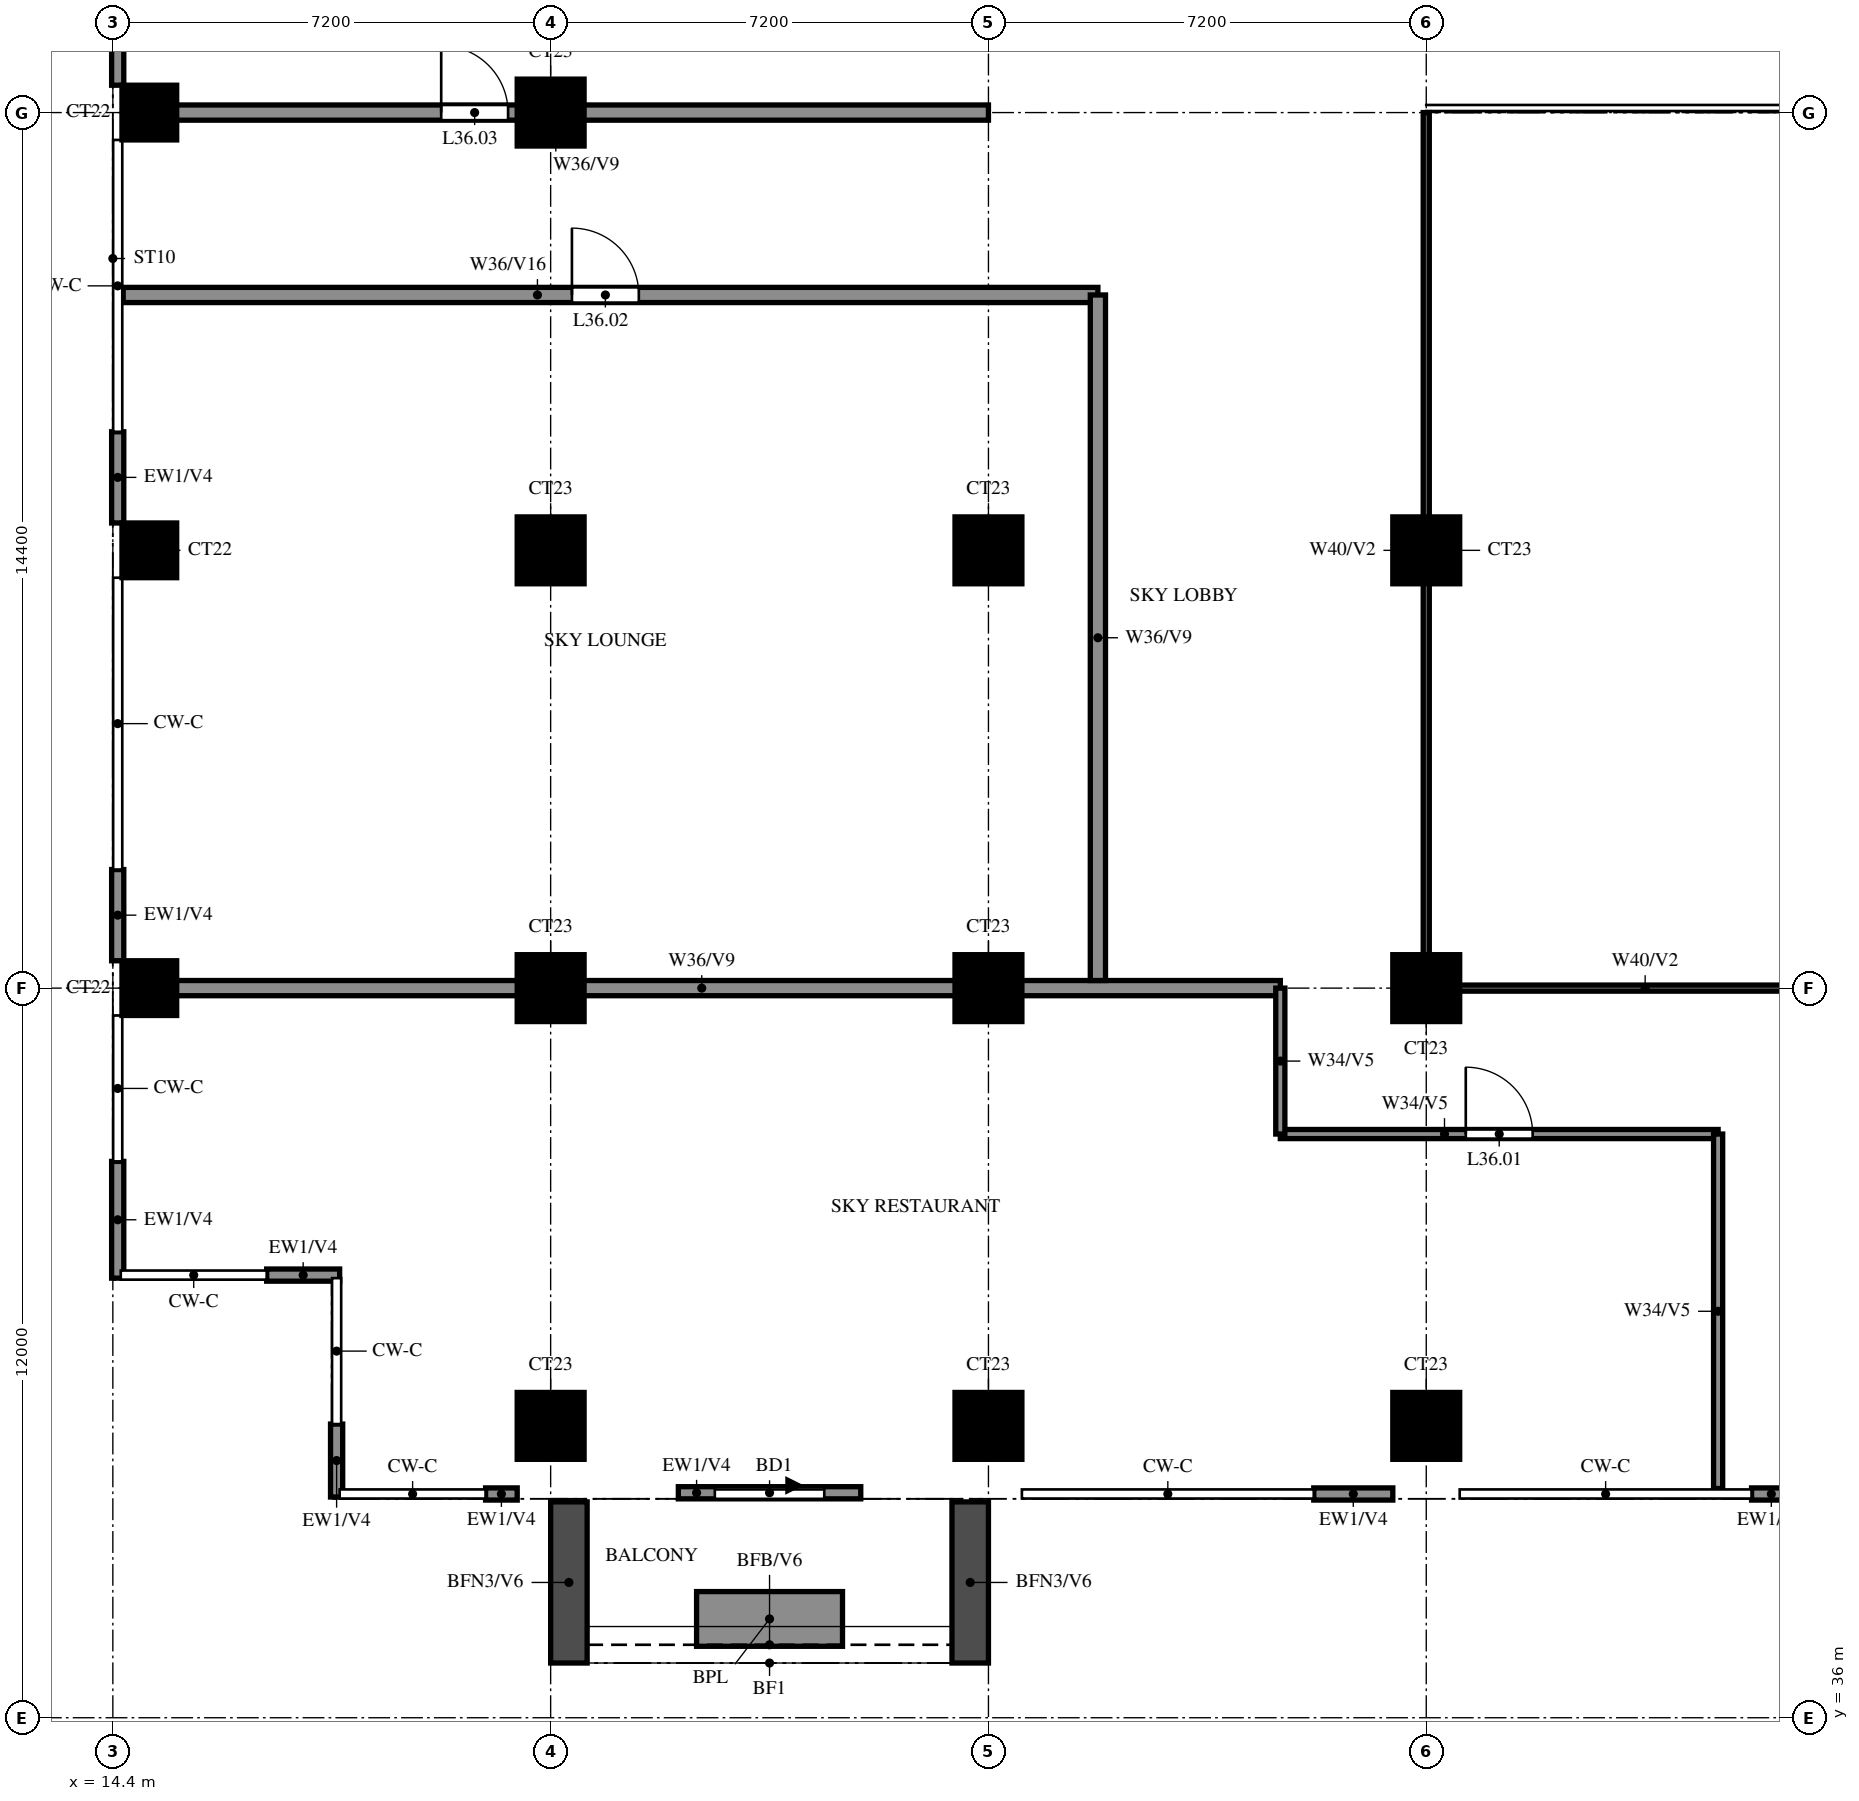
"""IFC4 building model, lengths in metres.
Left out: names, types, materials, properties, quantities, classifications, styles, units other than length and angle.
Written with IfcOpenShell. Run it as: python <this file> out.ifc"""

import sys

from ifc_helpers import new_model, si_unit, direction, frame, frame_2d, origin, origin_2d, place, context, subcontext, project, spatial, rectangle, extrude, source, transform, mapped, element, fill, save


model = new_model("IFC4")
c1 = context("Model", 3, precision=1e-05, world=origin(), true_north=direction((0.0, 1.0)))
c2 = subcontext(c1, "Body", "Model", "MODEL_VIEW")
j1 = project(units=[si_unit("LENGTHUNIT", "METRE"), si_unit("PLANEANGLEUNIT", "RADIAN")], contexts=[c1])
p1 = place(None, origin())
s1 = spatial("IfcSite", under=j1, at=p1, CompositionType="ELEMENT")
p2 = place(p1, origin())
s2 = spatial("IfcBuilding", under=s1, at=p2, CompositionType="ELEMENT")
p3 = place(p2, frame((0.0, 0.0, 137.5)))
s3 = spatial("IfcBuildingStorey", under=s2, at=p3, CompositionType="ELEMENT", Elevation=137.5)
m1 = source(origin(), c2, "Body", "SweptSolid", [
    extrude(rectangle(XDim=1.1, YDim=1.1, at=origin_2d()), origin(), (0.0, 0.0, 1.0), 5.2),
])
for number, where, z_axis, x_axis in (
    (1, (21.6, 40.8, 0.0), (0.0, 0.0, 1.0), (1.0, 0.0, 0.0)),
    (2, (28.8, 40.8, 0.0), (0.0, 0.0, 1.0), (1.0, 0.0, 0.0)),
    (3, (36.0, 40.8, 0.0), (0.0, 0.0, 1.0), (1.0, 0.0, 0.0)),
):
    element("IfcColumn", number, at=place(p3, frame(where, z_axis=z_axis, x_axis=x_axis)), inside=s3, PredefinedType="COLUMN", context=c2, shape_type="MappedRepresentation", body=[
        mapped(m1, transform((0.0, 0.0, 0.0))),
    ])
m2 = source(origin(), c2, "Body", "SweptSolid", [
    extrude(rectangle(XDim=0.9, YDim=0.9, at=origin_2d()), origin(), (0.0, 0.0, 1.0), 5.2),
])
p4 = place(p3, frame((15.0, 48.0, 0.0), z_axis=(0.0, 0.0, 1.0), x_axis=(1.0, 0.0, 0.0)))
e4 = element("IfcColumn", 4, at=p4, inside=s3, PredefinedType="COLUMN", context=c2, shape_type="MappedRepresentation", body=[
    mapped(m2, transform((0.0, 0.0, 0.0))),
])
for number, where, z_axis, x_axis in (
    (5, (21.6, 48.0, 0.0), (0.0, 0.0, 1.0), (1.0, 0.0, 0.0)),
    (6, (28.8, 48.0, 0.0), (0.0, 0.0, 1.0), (1.0, 0.0, 0.0)),
    (7, (36.0, 48.0, 0.0), (0.0, 0.0, 1.0), (1.0, 0.0, 0.0)),
):
    element("IfcColumn", number, at=place(p3, frame(where, z_axis=z_axis, x_axis=x_axis)), inside=s3, PredefinedType="COLUMN", context=c2, shape_type="MappedRepresentation", body=[
        mapped(m1, transform((0.0, 0.0, 0.0))),
    ])
p5 = place(p3, frame((15.0, 55.2, 0.0), z_axis=(0.0, 0.0, 1.0), x_axis=(1.0, 0.0, 0.0)))
e8 = element("IfcColumn", 8, at=p5, inside=s3, PredefinedType="COLUMN", context=c2, shape_type="MappedRepresentation", body=[
    mapped(m2, transform((0.0, 0.0, 0.0))),
])
for number, where, z_axis, x_axis in (
    (9, (21.6, 55.2, 0.0), (0.0, 0.0, 1.0), (1.0, 0.0, 0.0)),
    (10, (28.8, 55.2, 0.0), (0.0, 0.0, 1.0), (1.0, 0.0, 0.0)),
    (11, (36.0, 55.2, 0.0), (0.0, 0.0, 1.0), (1.0, 0.0, 0.0)),
):
    element("IfcColumn", number, at=place(p3, frame(where, z_axis=z_axis, x_axis=x_axis)), inside=s3, PredefinedType="COLUMN", context=c2, shape_type="MappedRepresentation", body=[
        mapped(m1, transform((0.0, 0.0, 0.0))),
    ])
p6 = place(p3, frame((15.0, 62.4, 0.0), z_axis=(0.0, 0.0, 1.0), x_axis=(1.0, 0.0, 0.0)))
e12 = element("IfcColumn", 12, at=p6, inside=s3, PredefinedType="COLUMN", context=c2, shape_type="MappedRepresentation", body=[
    mapped(m2, transform((0.0, 0.0, 0.0))),
])
p7 = place(p3, frame((21.6, 62.4, 0.0), z_axis=(0.0, 0.0, 1.0), x_axis=(1.0, 0.0, 0.0)))
e13 = element("IfcColumn", 13, at=p7, inside=s3, PredefinedType="COLUMN", context=c2, shape_type="MappedRepresentation", body=[
    mapped(m1, transform((0.0, 0.0, 0.0))),
])
for number, where, z_axis, x_axis in (
    (14, (14.48, 64.35, 0.0), (0.0, 0.0, 1.0), (0.0, -1.0, 0.0)),
    (15, (14.48, 57.15, 0.0), (0.0, 0.0, 1.0), (0.0, -1.0, 0.0)),
    (16, (14.48, 49.95, 0.0), (0.0, 0.0, 1.0), (0.0, -1.0, 0.0)),
):
    element("IfcWall", number, at=place(p3, frame(where, z_axis=z_axis, x_axis=x_axis)), inside=s3, PredefinedType="SOLIDWALL", context=c2, shape_type="SweptSolid", body=[
        extrude(rectangle(XDim=1.5, YDim=0.2, at=frame_2d((0.75, 0.0))), origin(), (0.0, 0.0, 1.0), 5.2),
    ])
p8 = place(p3, frame((14.48, 45.15, 0.0), z_axis=(0.0, 0.0, 1.0), x_axis=(0.0, -1.0, 0.0)))
e17 = element("IfcWall", 17, at=p8, inside=s3, PredefinedType="SOLIDWALL", context=c2, shape_type="SweptSolid", body=[
    extrude(rectangle(XDim=1.92, YDim=0.2, at=frame_2d((0.96, 0.0))), origin(), (0.0, 0.0, 1.0), 5.2),
])
p9 = place(p3, frame((16.93, 43.28, 0.0), z_axis=(0.0, 0.0, 1.0), x_axis=(1.0, 0.0, 0.0)))
e18 = element("IfcWall", 18, at=p9, inside=s3, PredefinedType="SOLIDWALL", context=c2, shape_type="SweptSolid", body=[
    extrude(rectangle(XDim=1.2, YDim=0.2, at=frame_2d((0.6, 0.0))), origin(), (0.0, 0.0, 1.0), 5.2),
])
p10 = place(p3, frame((18.08, 40.83, 0.0), z_axis=(0.0, 0.0, 1.0), x_axis=(0.0, -1.0, 0.0)))
e19 = element("IfcWall", 19, at=p10, inside=s3, PredefinedType="SOLIDWALL", context=c2, shape_type="SweptSolid", body=[
    extrude(rectangle(XDim=1.2, YDim=0.2, at=frame_2d((0.6, 0.0))), origin(), (0.0, 0.0, 1.0), 5.2),
])
p11 = place(p3, frame((23.7, 39.7, 0.0), z_axis=(0.0, 0.0, 1.0), x_axis=(1.0, 0.0, 0.0)))
e20 = element("IfcWall", 20, at=p11, inside=s3, PredefinedType="SOLIDWALL", context=c2, shape_type="SweptSolid", body=[
    extrude(rectangle(XDim=3.0, YDim=0.2, at=frame_2d((1.5, 0.0))), origin(), (0.0, 0.0, 1.0), 5.2),
])
p12 = place(p11, frame((0.6, 0.0, 0.0)))
e21 = element("IfcOpeningElement", 21, at=p12, cuts=e20, PredefinedType="OPENING", context=c2, shape_type="SweptSolid", body=[
    extrude(rectangle(XDim=1.8, YDim=2.4, at=frame_2d((0.9, 1.2))), frame((0.0, 0.11, 0.0), z_axis=(0.0, -1.0, 0.0), x_axis=(1.0, 0.0, 0.0)), (0.0, 0.0, 1.0), 0.22),
])
p13 = place(p3, frame((20.53, 39.68, 0.0), z_axis=(0.0, 0.0, 1.0), x_axis=(1.0, 0.0, 0.0)))
e22 = element("IfcWall", 22, at=p13, inside=s3, PredefinedType="SOLIDWALL", context=c2, shape_type="SweptSolid", body=[
    extrude(rectangle(XDim=0.52, YDim=0.2, at=frame_2d((0.26, 0.0))), origin(), (0.0, 0.0, 1.0), 5.2),
])
p14 = place(p3, frame((34.15, 39.68, 0.0), z_axis=(0.0, 0.0, 1.0), x_axis=(1.0, 0.0, 0.0)))
e23 = element("IfcWall", 23, at=p14, inside=s3, PredefinedType="SOLIDWALL", context=c2, shape_type="SweptSolid", body=[
    extrude(rectangle(XDim=1.3, YDim=0.2, at=frame_2d((0.65, 0.0))), origin(), (0.0, 0.0, 1.0), 5.2),
])
p15 = place(p3, frame((41.35, 39.68, 0.0), z_axis=(0.0, 0.0, 1.0), x_axis=(1.0, 0.0, 0.0)))
e24 = element("IfcWall", 24, at=p15, inside=s3, PredefinedType="SOLIDWALL", context=c2, shape_type="SweptSolid", body=[
    extrude(rectangle(XDim=0.65, YDim=0.2, at=frame_2d((0.325, 0.0))), origin(), (0.0, 0.0, 1.0), 5.2),
])
for number, where, z_axis, x_axis in (
    (25, (21.9, 39.55, 0.0), (0.0, 0.0, 1.0), (0.0, -1.0, 0.0)),
    (26, (28.5, 39.55, 0.0), (0.0, 0.0, 1.0), (0.0, -1.0, 0.0)),
):
    element("IfcWall", number, at=place(p3, frame(where, z_axis=z_axis, x_axis=x_axis)), inside=s3, PredefinedType="SOLIDWALL", context=c2, shape_type="SweptSolid", body=[
        extrude(rectangle(XDim=2.65, YDim=0.6, at=frame_2d((1.325, 0.0))), origin(), (0.0, 0.0, 1.0), 4.9),
    ])
p16 = place(p3, frame((24.0, 37.625, 0.0), z_axis=(0.0, 0.0, 1.0), x_axis=(1.0, 0.0, 0.0)))
e27 = element("IfcWall", 27, at=p16, inside=s3, PredefinedType="SOLIDWALL", context=c2, shape_type="SweptSolid", body=[
    extrude(rectangle(XDim=2.4, YDim=0.9, at=frame_2d((1.2, 0.0))), origin(), (0.0, 0.0, 1.0), 0.9),
])
p17 = place(p3, frame((33.6, 45.6, 0.0), z_axis=(0.0, 0.0, 1.0), x_axis=(1.0, 0.0, 0.0)))
e28 = element("IfcWall", 28, at=p17, inside=s3, PredefinedType="PARTITIONING", context=c2, shape_type="SweptSolid", body=[
    extrude(rectangle(XDim=7.2, YDim=0.15, at=frame_2d((3.6, 0.0))), origin(), (0.0, 0.0, 1.0), 5.2),
])
p18 = place(p17, frame((3.05, 0.0, 0.0)))
e29 = element("IfcOpeningElement", 29, at=p18, cuts=e28, PredefinedType="OPENING", context=c2, shape_type="SweptSolid", body=[
    extrude(rectangle(XDim=1.1, YDim=2.1, at=frame_2d((0.55, 1.05))), frame((0.0, 0.085, 0.0), z_axis=(0.0, -1.0, 0.0), x_axis=(1.0, 0.0, 0.0)), (0.0, 0.0, 1.0), 0.17),
])
p19 = place(p3, frame((36.0, 48.0, 0.0), z_axis=(0.0, 0.0, 1.0), x_axis=(1.0, 0.0, 0.0)))
e30 = element("IfcWall", 30, at=p19, inside=s3, PredefinedType="PARTITIONING", context=c2, shape_type="SweptSolid", body=[
    extrude(rectangle(XDim=7.2, YDim=0.1, at=frame_2d((3.6, 0.0))), origin(), (0.0, 0.0, 1.0), 4.3),
])
p20 = place(p3, frame((14.57, 48.0, 0.0), z_axis=(0.0, 0.0, 1.0), x_axis=(1.0, 0.0, 0.0)))
e31 = element("IfcWall", 31, at=p20, inside=s3, PredefinedType="SOLIDWALL", context=c2, shape_type="SweptSolid", body=[
    extrude(rectangle(XDim=19.03, YDim=0.25, at=frame_2d((9.515, 0.0))), origin(), (0.0, 0.0, 1.0), 5.2),
])
p21 = place(p3, frame((14.57, 59.4, 0.0), z_axis=(0.0, 0.0, 1.0), x_axis=(1.0, 0.0, 0.0)))
e32 = element("IfcWall", 32, at=p21, inside=s3, PredefinedType="SOLIDWALL", context=c2, shape_type="SweptSolid", body=[
    extrude(rectangle(XDim=16.03, YDim=0.25, at=frame_2d((8.015, 0.0))), origin(), (0.0, 0.0, 1.0), 4.3),
])
p22 = place(p21, frame((7.38, 0.0, 0.0)))
e33 = element("IfcOpeningElement", 33, at=p22, cuts=e32, PredefinedType="OPENING", context=c2, shape_type="SweptSolid", body=[
    extrude(rectangle(XDim=1.1, YDim=2.1, at=frame_2d((0.55, 1.05))), frame((0.0, 0.135, 0.0), z_axis=(0.0, -1.0, 0.0), x_axis=(1.0, 0.0, 0.0)), (0.0, 0.0, 1.0), 0.27),
])
p23 = place(p3, frame((14.57, 62.4, 0.0), z_axis=(0.0, 0.0, 1.0), x_axis=(1.0, 0.0, 0.0)))
e34 = element("IfcWall", 34, at=p23, inside=s3, PredefinedType="SOLIDWALL", context=c2, shape_type="SweptSolid", body=[
    extrude(rectangle(XDim=14.23, YDim=0.25, at=frame_2d((7.115, 0.0))), origin(), (0.0, 0.0, 1.0), 5.2),
])
p24 = place(p23, frame((5.23, 0.0, 0.0)))
e35 = element("IfcOpeningElement", 35, at=p24, cuts=e34, PredefinedType="OPENING", context=c2, shape_type="SweptSolid", body=[
    extrude(rectangle(XDim=1.1, YDim=2.1, at=frame_2d((0.55, 1.05))), frame((0.0, 0.135, 0.0), z_axis=(0.0, -1.0, 0.0), x_axis=(1.0, 0.0, 0.0)), (0.0, 0.0, 1.0), 0.27),
])
p25 = place(p3, frame((30.6, 48.125, 0.0), z_axis=(0.0, 0.0, 1.0), x_axis=(0.0, 1.0, 0.0)))
e36 = element("IfcWall", 36, at=p25, inside=s3, PredefinedType="SOLIDWALL", context=c2, shape_type="SweptSolid", body=[
    extrude(rectangle(XDim=11.275, YDim=0.25, at=frame_2d((5.637, 0.0))), origin(), (0.0, 0.0, 1.0), 5.2),
])
p26 = place(p3, frame((33.6, 45.6, 0.0), z_axis=(0.0, 0.0, 1.0), x_axis=(0.0, 1.0, 0.0)))
e37 = element("IfcWall", 37, at=p26, inside=s3, PredefinedType="PARTITIONING", context=c2, shape_type="SweptSolid", body=[
    extrude(rectangle(XDim=2.4, YDim=0.15, at=frame_2d((1.2, 0.0))), origin(), (0.0, 0.0, 1.0), 5.2),
])
p27 = place(p3, frame((36.0, 48.0, 0.0), z_axis=(0.0, 0.0, 1.0), x_axis=(0.0, 1.0, 0.0)))
e38 = element("IfcWall", 38, at=p27, inside=s3, PredefinedType="PARTITIONING", context=c2, shape_type="SweptSolid", body=[
    extrude(rectangle(XDim=14.4, YDim=0.1, at=frame_2d((7.2, 0.0))), origin(), (0.0, 0.0, 1.0), 4.3),
])
p28 = place(p3, frame((40.8, 39.77, 0.0), z_axis=(0.0, 0.0, 1.0), x_axis=(0.0, 1.0, 0.0)))
e39 = element("IfcWall", 39, at=p28, inside=s3, PredefinedType="PARTITIONING", context=c2, shape_type="SweptSolid", body=[
    extrude(rectangle(XDim=5.83, YDim=0.15, at=frame_2d((2.915, 0.0))), origin(), (0.0, 0.0, 1.0), 5.2),
])
p29 = place(p12, origin())
e40 = element("IfcDoor", 40, at=p29, inside=s3, OperationType="DOUBLE_DOOR_SLIDING", PredefinedType="DOOR", context=c2, shape_type="SweptSolid", body=[
    extrude(rectangle(XDim=1.8, YDim=2.4, at=frame_2d((0.9, 1.2))), frame((0.0, 0.025, 0.0), z_axis=(0.0, -1.0, 0.0), x_axis=(1.0, 0.0, 0.0)), (0.0, 0.0, 1.0), 0.05),
])
fill(e21, e40)
p30 = place(p18, origin())
e41 = element("IfcDoor", 41, at=p30, inside=s3, OperationType="SINGLE_SWING_RIGHT", PredefinedType="DOOR", context=c2, shape_type="SweptSolid", body=[
    extrude(rectangle(XDim=1.1, YDim=2.1, at=frame_2d((0.55, 1.05))), frame((0.0, 0.025, 0.0), z_axis=(0.0, -1.0, 0.0), x_axis=(1.0, 0.0, 0.0)), (0.0, 0.0, 1.0), 0.05),
])
fill(e29, e41)
p31 = place(p22, origin())
e42 = element("IfcDoor", 42, at=p31, inside=s3, OperationType="SINGLE_SWING_LEFT", PredefinedType="DOOR", context=c2, shape_type="SweptSolid", body=[
    extrude(rectangle(XDim=1.1, YDim=2.1, at=frame_2d((0.55, 1.05))), frame((0.0, 0.025, 0.0), z_axis=(0.0, -1.0, 0.0), x_axis=(1.0, 0.0, 0.0)), (0.0, 0.0, 1.0), 0.05),
])
fill(e33, e42)
p32 = place(p24, origin())
e43 = element("IfcDoor", 43, at=p32, inside=s3, OperationType="SINGLE_SWING_LEFT", PredefinedType="DOOR", context=c2, shape_type="SweptSolid", body=[
    extrude(rectangle(XDim=1.1, YDim=2.1, at=frame_2d((0.55, 1.05))), frame((0.0, 0.025, 0.0), z_axis=(0.0, -1.0, 0.0), x_axis=(1.0, 0.0, 0.0)), (0.0, 0.0, 1.0), 0.05),
])
fill(e35, e43)
save(model, sys.argv[1])
